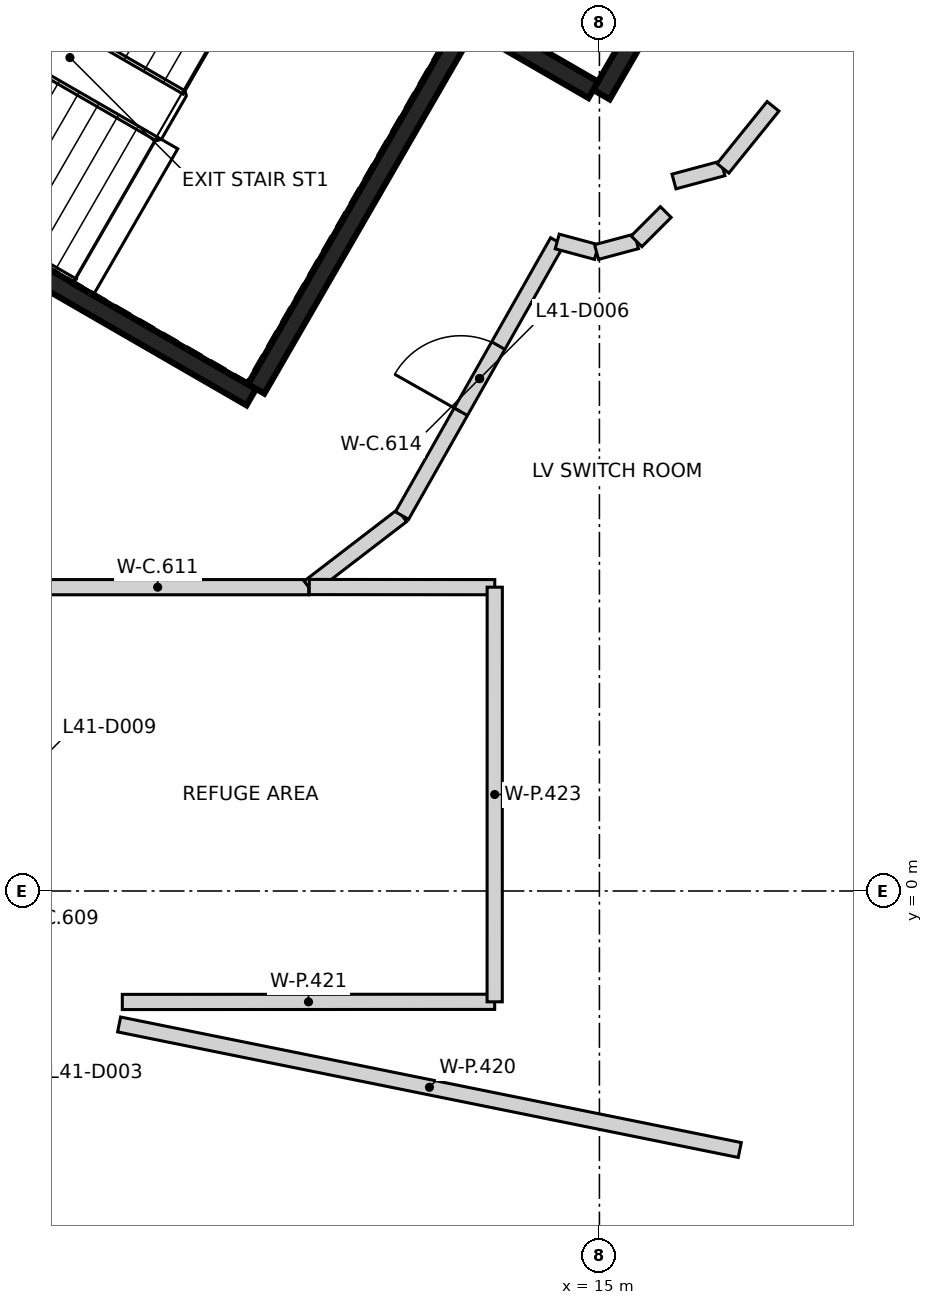
"""IFC4 building model, lengths in metres.
Left out: names, types, materials, properties, quantities, classifications, styles, units other than length and angle.
Written with IfcOpenShell. Run it as: python <this file> out.ifc"""

import sys

from ifc_helpers import new_model, si_unit, direction, frame, frame_2d, origin, place, context, subcontext, project, spatial, rectangle, extrude, element, fill, save


model = new_model("IFC4")
c1 = context("Model", 3, precision=1e-05, world=origin(), true_north=direction((0.0, 1.0)))
c2 = subcontext(c1, "Body", "Model", "MODEL_VIEW")
j1 = project(units=[si_unit("LENGTHUNIT", "METRE"), si_unit("PLANEANGLEUNIT", "RADIAN")], contexts=[c1])
p1 = place(None, origin())
s1 = spatial("IfcSite", under=j1, at=p1, CompositionType="ELEMENT")
p2 = place(p1, origin())
s2 = spatial("IfcBuilding", under=s1, at=p2, CompositionType="ELEMENT")
p3 = place(p2, frame((0.0, 0.0, 164.8)))
s3 = spatial("IfcBuildingStorey", under=s2, at=p3, CompositionType="ELEMENT", Elevation=164.8)
p4 = place(p3, frame((10.42, 6.498, 0.0), z_axis=(0.0, 0.0, 1.0), x_axis=(-0.866021906294, 0.500006057782, 0.0)))
e1 = element("IfcWall", 1, at=p4, inside=s3, PredefinedType="SHEAR", context=c2, shape_type="SweptSolid", body=[
    extrude(rectangle(XDim=11.55, YDim=0.25, at=frame_2d((5.775, 0.0))), origin(), (0.0, 0.0, 1.0), 4.45),
])
p5 = place(p4, frame((10.025, 0.0, 0.0)))
e2 = element("IfcOpeningElement", 2, at=p5, cuts=e1, PredefinedType="OPENING", context=c2, shape_type="SweptSolid", body=[
    extrude(rectangle(XDim=1.2, YDim=2.1, at=frame_2d((0.6, 1.05))), frame((0.0, 0.135, 0.0), z_axis=(0.0, -1.0, 0.0), x_axis=(1.0, 0.0, 0.0)), (0.0, 0.0, 1.0), 0.27),
])
p6 = place(p4, frame((8.725, 0.0, 0.0)))
e3 = element("IfcOpeningElement", 3, at=p6, cuts=e1, PredefinedType="OPENING", context=c2, shape_type="SweptSolid", body=[
    extrude(rectangle(XDim=1.2, YDim=2.1, at=frame_2d((0.6, 1.05))), frame((0.0, 0.135, 0.0), z_axis=(0.0, -1.0, 0.0), x_axis=(1.0, 0.0, 0.0)), (0.0, 0.0, 1.0), 0.27),
])
p7 = place(p3, frame((13.238, 11.378, 0.0), z_axis=(0.0, 0.0, 1.0), x_axis=(-0.500008851346, -0.866020293397, 0.0)))
e4 = element("IfcWall", 4, at=p7, inside=s3, PredefinedType="SHEAR", context=c2, shape_type="SweptSolid", body=[
    extrude(rectangle(XDim=5.51, YDim=0.25, at=frame_2d((2.755, 0.0))), origin(), (0.0, 0.0, 1.0), 4.45),
])
p8 = place(p3, frame((16.552, 13.119, 0.0), z_axis=(0.0, 0.0, 1.0), x_axis=(-0.499978833458, -0.866037623948, 0.0)))
e5 = element("IfcWall", 5, at=p8, inside=s3, PredefinedType="SHEAR", context=c2, shape_type="SweptSolid", body=[
    extrude(rectangle(XDim=3.05, YDim=0.25, at=frame_2d((1.525, 0.0))), origin(), (0.0, 0.0, 1.0), 4.45),
])
p9 = place(p3, frame((14.918, 10.54, 0.0), z_axis=(0.0, 0.0, 1.0), x_axis=(-0.866063538972, 0.499933942099, 0.0)))
e6 = element("IfcWall", 6, at=p9, inside=s3, PredefinedType="SHEAR", context=c2, shape_type="SweptSolid", body=[
    extrude(rectangle(XDim=2.865, YDim=0.25, at=frame_2d((1.432, 0.0))), origin(), (0.0, 0.0, 1.0), 4.45),
])
p10 = place(p3, frame((7.2, 3.997, 0.0), z_axis=(0.0, 0.0, 1.0), x_axis=(1.0, 0.0, 0.0)))
e7 = element("IfcWall", 7, at=p10, inside=s3, PredefinedType="PARTITIONING", context=c2, shape_type="SweptSolid", body=[
    extrude(rectangle(XDim=3.976, YDim=0.2, at=frame_2d((1.988, 0.0))), origin(), (0.0, 0.0, 1.0), 4.45),
])
p11 = place(p3, frame((11.176, 3.997, 0.0), z_axis=(0.0, 0.0, 1.0), x_axis=(0.793245502763, 0.608901939845, 0.0)))
e8 = element("IfcWall", 8, at=p11, inside=s3, PredefinedType="PARTITIONING", context=c2, shape_type="SweptSolid", body=[
    extrude(rectangle(XDim=1.547, YDim=0.2, at=frame_2d((0.773, 0.0))), origin(), (0.0, 0.0, 1.0), 4.45),
])
p12 = place(p3, frame((12.403, 4.939, 0.0), z_axis=(0.0, 0.0, 1.0), x_axis=(0.492759848643, 0.870165347256, 0.0)))
e9 = element("IfcWall", 9, at=p12, inside=s3, PredefinedType="PARTITIONING", context=c2, shape_type="SweptSolid", body=[
    extrude(rectangle(XDim=4.144, YDim=0.2, at=frame_2d((2.072, 0.0))), origin(), (0.0, 0.0, 1.0), 4.45),
])
p13 = place(p12, frame((1.57, 0.0, 0.0)))
e10 = element("IfcOpeningElement", 10, at=p13, cuts=e9, PredefinedType="OPENING", context=c2, shape_type="SweptSolid", body=[
    extrude(rectangle(XDim=1.0, YDim=2.1, at=frame_2d((0.5, 1.05))), frame((0.0, 0.11, 0.0), z_axis=(0.0, -1.0, 0.0), x_axis=(1.0, 0.0, 0.0)), (0.0, 0.0, 1.0), 0.22),
])
p14 = place(p3, frame((14.445, 8.545, 0.0), z_axis=(0.0, 0.0, 1.0), x_axis=(0.965725783492, -0.259564464245, 0.0)))
e11 = element("IfcWall", 11, at=p14, inside=s3, PredefinedType="PARTITIONING", context=c2, shape_type="SweptSolid", body=[
    extrude(rectangle(XDim=0.535, YDim=0.2, at=frame_2d((0.268, 0.0))), origin(), (0.0, 0.0, 1.0), 4.45),
])
p15 = place(p3, frame((14.962, 8.406, 0.0), z_axis=(0.0, 0.0, 1.0), x_axis=(0.965861986138, 0.259057182361, 0.0)))
e12 = element("IfcWall", 12, at=p15, inside=s3, PredefinedType="PARTITIONING", context=c2, shape_type="SweptSolid", body=[
    extrude(rectangle(XDim=0.545, YDim=0.2, at=frame_2d((0.272, 0.0))), origin(), (0.0, 0.0, 1.0), 4.45),
])
p16 = place(p3, frame((15.488, 8.547, 0.0), z_axis=(0.0, 0.0, 1.0), x_axis=(0.707331010369, 0.706882480876, 0.0)))
e13 = element("IfcWall", 13, at=p16, inside=s3, PredefinedType="PARTITIONING", context=c2, shape_type="SweptSolid", body=[
    extrude(rectangle(XDim=0.544, YDim=0.2, at=frame_2d((0.272, 0.0))), origin(), (0.0, 0.0, 1.0), 4.45),
])
p17 = place(p3, frame((15.981, 9.334, 0.0), z_axis=(0.0, 0.0, 1.0), x_axis=(0.965728774368, 0.25955333625, 0.0)))
e14 = element("IfcWall", 14, at=p17, inside=s3, PredefinedType="PARTITIONING", context=c2, shape_type="SweptSolid", body=[
    extrude(rectangle(XDim=0.667, YDim=0.2, at=frame_2d((0.333, 0.0))), origin(), (0.0, 0.0, 1.0), 4.45),
])
p18 = place(p3, frame((16.625, 9.507, 0.0), z_axis=(0.0, 0.0, 1.0), x_axis=(0.628293758017, 0.777976190919, 0.0)))
e15 = element("IfcWall", 15, at=p18, inside=s3, PredefinedType="PARTITIONING", context=c2, shape_type="SweptSolid", body=[
    extrude(rectangle(XDim=1.049, YDim=0.2, at=frame_2d((0.524, 0.0))), origin(), (0.0, 0.0, 1.0), 4.45),
])
p19 = place(p3, frame((8.681, -1.756, 0.0), z_axis=(0.0, 0.0, 1.0), x_axis=(0.980151165676, -0.198251588704, 0.0)))
e16 = element("IfcWall", 16, at=p19, inside=s3, PredefinedType="PARTITIONING", context=c2, shape_type="SweptSolid", body=[
    extrude(rectangle(XDim=8.331, YDim=0.2, at=frame_2d((4.166, 0.0))), origin(), (0.0, 0.0, 1.0), 4.45),
])
p20 = place(p3, frame((8.723, -1.46, 0.0), z_axis=(0.0, 0.0, 1.0), x_axis=(0.999999920533, 0.000398664442, 0.0)))
e17 = element("IfcWall", 17, at=p20, inside=s3, PredefinedType="PARTITIONING", context=c2, shape_type="SweptSolid", body=[
    extrude(rectangle(XDim=4.899, YDim=0.2, at=frame_2d((2.45, 0.0))), origin(), (0.0, 0.0, 1.0), 4.45),
])
p21 = place(p3, frame((11.183, 3.999, 0.0), z_axis=(0.0, 0.0, 1.0), x_axis=(0.999999679616, -0.000800480032, 0.0)))
e18 = element("IfcWall", 18, at=p21, inside=s3, PredefinedType="PARTITIONING", context=c2, shape_type="SweptSolid", body=[
    extrude(rectangle(XDim=2.44, YDim=0.2, at=frame_2d((1.22, 0.0))), origin(), (0.0, 0.0, 1.0), 4.45),
])
p22 = place(p3, frame((13.622, -1.458, 0.0), z_axis=(0.0, 0.0, 1.0), x_axis=(0.000179018973, 0.999999983976, 0.0)))
e19 = element("IfcWall", 19, at=p22, inside=s3, PredefinedType="PARTITIONING", context=c2, shape_type="SweptSolid", body=[
    extrude(rectangle(XDim=5.455, YDim=0.2, at=frame_2d((2.728, 0.0))), origin(), (0.0, 0.0, 1.0), 4.45),
])
p23 = place(p13, frame((1.0, 0.0, 0.0), z_axis=(0.0, 0.0, 1.0), x_axis=(-1.0, 0.0, 0.0)))
e20 = element("IfcDoor", 20, at=p23, inside=s3, OperationType="SINGLE_SWING_LEFT", PredefinedType="DOOR", context=c2, shape_type="SweptSolid", body=[
    extrude(rectangle(XDim=1.0, YDim=2.1, at=frame_2d((0.5, 1.05))), frame((0.0, 0.025, 0.0), z_axis=(0.0, -1.0, 0.0), x_axis=(1.0, 0.0, 0.0)), (0.0, 0.0, 1.0), 0.05),
])
fill(e10, e20)
save(model, sys.argv[1])
